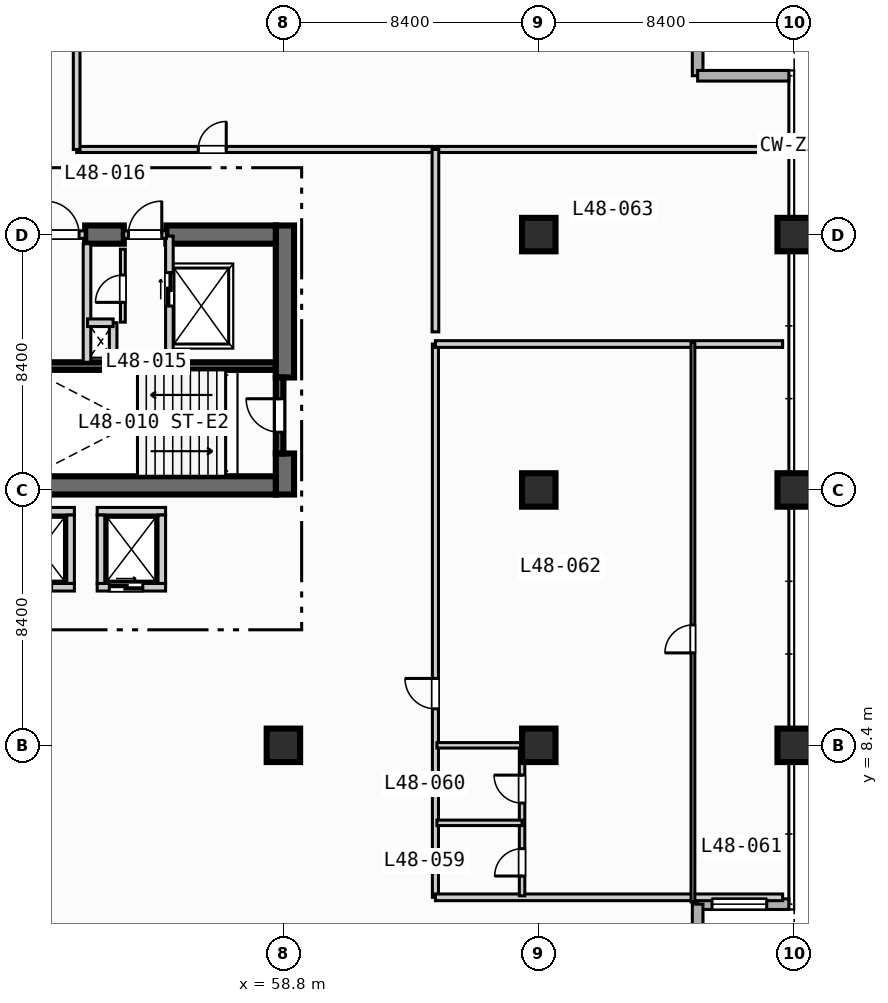
"""IFC4 building model, lengths in metres.
Left out: names, types, materials, properties, quantities, classifications, styles, units other than length and angle.
Written with IfcOpenShell. Run it as: python <this file> out.ifc"""

import sys

from ifc_helpers import new_model, si_unit, direction, frame, frame_2d, origin, origin_2d, place, context, subcontext, project, spatial, rectangle, extrude, element, fill, save


model = new_model("IFC4")
c1 = context("Model", 3, precision=1e-05, world=origin(), true_north=direction((0.0, 1.0)))
c2 = subcontext(c1, "Body", "Model", "MODEL_VIEW")
j1 = project(units=[si_unit("LENGTHUNIT", "METRE"), si_unit("PLANEANGLEUNIT", "RADIAN")], contexts=[c1])
p1 = place(None, origin())
s1 = spatial("IfcSite", under=j1, at=p1, CompositionType="ELEMENT")
p2 = place(p1, origin())
s2 = spatial("IfcBuilding", under=s1, at=p2, CompositionType="ELEMENT")
p3 = place(p2, frame((0.0, 0.0, 197.6)))
s3 = spatial("IfcBuildingStorey", under=s2, at=p3, CompositionType="ELEMENT", Elevation=197.6)
p4 = place(p3, frame((50.5, 20.875, 0.0), z_axis=(0.0, 0.0, 1.0), x_axis=(1.0, 0.0, 0.0)))
e1 = element("IfcWall", 1, at=p4, inside=s3, PredefinedType="SOLIDWALL", context=c2, shape_type="SweptSolid", body=[
    extrude(rectangle(XDim=8.05, YDim=0.25, at=frame_2d((4.025, 0.0))), origin(), (0.0, 0.0, 1.0), 3.47),
])
p5 = place(p3, frame((58.85, 16.65, 0.0), z_axis=(0.0, 0.0, 1.0), x_axis=(0.0, 1.0, 0.0)))
e2 = element("IfcWall", 2, at=p5, inside=s3, PredefinedType="SHEAR", context=c2, shape_type="SweptSolid", body=[
    extrude(rectangle(XDim=1.35, YDim=0.6, at=frame_2d((0.675, 0.0))), origin(), (0.0, 0.0, 1.0), 3.47),
])
p6 = place(p3, frame((58.85, 20.5, 0.0), z_axis=(0.0, 0.0, 1.0), x_axis=(0.0, 1.0, 0.0)))
e3 = element("IfcWall", 3, at=p6, inside=s3, PredefinedType="SHEAR", context=c2, shape_type="SweptSolid", body=[
    extrude(rectangle(XDim=5.0, YDim=0.6, at=frame_2d((2.5, 0.0))), origin(), (0.0, 0.0, 1.0), 3.47),
])
p7 = place(p3, frame((42.2, 16.95, 0.0), z_axis=(0.0, 0.0, 1.0), x_axis=(1.0, 0.0, 0.0)))
e4 = element("IfcWall", 4, at=p7, inside=s3, PredefinedType="SHEAR", context=c2, shape_type="SweptSolid", body=[
    extrude(rectangle(XDim=16.35, YDim=0.6, at=frame_2d((8.175, 0.0))), origin(), (0.0, 0.0, 1.0), 3.47),
])
p8 = place(p3, frame((52.28, 25.2, 0.0), z_axis=(0.0, 0.0, 1.0), x_axis=(1.0, 0.0, 0.0)))
e5 = element("IfcWall", 5, at=p8, inside=s3, PredefinedType="SHEAR", context=c2, shape_type="SweptSolid", body=[
    extrude(rectangle(XDim=1.27, YDim=0.6, at=frame_2d((0.635, 0.0))), origin(), (0.0, 0.0, 1.0), 3.47),
])
p9 = place(p3, frame((54.95, 25.2, 0.0), z_axis=(0.0, 0.0, 1.0), x_axis=(1.0, 0.0, 0.0)))
e6 = element("IfcWall", 6, at=p9, inside=s3, PredefinedType="SHEAR", context=c2, shape_type="SweptSolid", body=[
    extrude(rectangle(XDim=3.6, YDim=0.6, at=frame_2d((1.8, 0.0))), origin(), (0.0, 0.0, 1.0), 3.47),
])
for number, where, z_axis, x_axis in (
    (7, (58.8, 8.4, 0.0), (0.0, 0.0, 1.0), (1.0, 0.0, 0.0)),
    (8, (67.2, 8.4, 0.0), (0.0, 0.0, 1.0), (1.0, 0.0, 0.0)),
    (9, (67.2, 16.8, 0.0), (0.0, 0.0, 1.0), (1.0, 0.0, 0.0)),
    (10, (67.2, 25.2, 0.0), (0.0, 0.0, 1.0), (1.0, 0.0, 0.0)),
    (11, (75.6, 8.4, 0.0), (0.0, 0.0, 1.0), (1.0, 0.0, 0.0)),
    (12, (75.6, 16.8, 0.0), (0.0, 0.0, 1.0), (1.0, 0.0, 0.0)),
    (13, (75.6, 25.2, 0.0), (0.0, 0.0, 1.0), (1.0, 0.0, 0.0)),
):
    element("IfcColumn", number, at=place(p3, frame(where, z_axis=z_axis, x_axis=x_axis)), inside=s3, PredefinedType="COLUMN", context=c2, shape_type="SweptSolid", body=[
        extrude(rectangle(XDim=1.1, YDim=1.1, at=origin_2d()), origin(), (0.0, 0.0, 1.0), 3.7),
    ])
for number, where, z_axis, x_axis in (
    (14, (72.425, 33.425, 0.0), (0.0, 0.0, 1.0), (0.0, -1.0, 0.0)),
    (15, (72.425, 30.425, 0.0), (0.0, 0.0, 1.0), (1.0, 0.0, 0.0)),
):
    element("IfcWall", number, at=place(p3, frame(where, z_axis=z_axis, x_axis=x_axis)), inside=s3, PredefinedType="STANDARD", context=c2, shape_type="SweptSolid", body=[
        extrude(rectangle(XDim=3.0, YDim=0.35, at=frame_2d((1.5, 0.0))), origin(), (0.0, 0.0, 1.0), 3.47),
    ])
p10 = place(p3, frame((75.425, 3.175, 0.0), z_axis=(0.0, 0.0, 1.0), x_axis=(-1.0, 0.0, 0.0)))
e16 = element("IfcWall", 16, at=p10, inside=s3, PredefinedType="STANDARD", context=c2, shape_type="SweptSolid", body=[
    extrude(rectangle(XDim=3.0, YDim=0.35, at=frame_2d((1.5, 0.0))), origin(), (0.0, 0.0, 1.0), 3.47),
])
p11 = place(p10, frame((0.728, 0.0, 0.85)))
e17 = element("IfcOpeningElement", 17, at=p11, cuts=e16, PredefinedType="OPENING", context=c2, shape_type="SweptSolid", body=[
    extrude(rectangle(XDim=1.8, YDim=1.8, at=frame_2d((0.9, 0.9))), frame((0.0, 0.185, 0.0), z_axis=(0.0, -1.0, 0.0), x_axis=(1.0, 0.0, 0.0)), (0.0, 0.0, 1.0), 0.37),
])
p12 = place(p3, frame((72.425, 3.175, 0.0), z_axis=(0.0, 0.0, 1.0), x_axis=(0.0, -1.0, 0.0)))
e18 = element("IfcWall", 18, at=p12, inside=s3, PredefinedType="STANDARD", context=c2, shape_type="SweptSolid", body=[
    extrude(rectangle(XDim=3.0, YDim=0.35, at=frame_2d((1.5, 0.0))), origin(), (0.0, 0.0, 1.0), 3.47),
])
p13 = place(p3, frame((58.675, 18.0, 0.0), z_axis=(0.0, 0.0, 1.0), x_axis=(0.0, 1.0, 0.0)))
e19 = element("IfcWall", 19, at=p13, inside=s3, PredefinedType="SOLIDWALL", context=c2, shape_type="SweptSolid", body=[
    extrude(rectangle(XDim=2.5, YDim=0.25, at=frame_2d((1.25, 0.0))), origin(), (0.0, 0.0, 1.0), 3.47),
])
p14 = place(p13, frame((0.7, 0.0, 0.0)))
e20 = element("IfcOpeningElement", 20, at=p14, cuts=e19, PredefinedType="OPENING", context=c2, shape_type="SweptSolid", body=[
    extrude(rectangle(XDim=1.1, YDim=2.15, at=frame_2d((0.55, 1.075))), frame((0.0, 0.135, 0.0), z_axis=(0.0, -1.0, 0.0), x_axis=(1.0, 0.0, 0.0)), (0.0, 0.0, 1.0), 0.27),
])
p15 = place(p3, frame((50.8, 25.2, 0.0), z_axis=(0.0, 0.0, 1.0), x_axis=(1.0, 0.0, 0.0)))
e21 = element("IfcWall", 21, at=p15, inside=s3, PredefinedType="SOLIDWALL", context=c2, shape_type="SweptSolid", body=[
    extrude(rectangle(XDim=1.48, YDim=0.25, at=frame_2d((0.74, 0.0))), origin(), (0.0, 0.0, 1.0), 3.47),
])
p16 = place(p15, frame((0.18, 0.0, 0.0)))
e22 = element("IfcOpeningElement", 22, at=p16, cuts=e21, PredefinedType="OPENING", context=c2, shape_type="SweptSolid", body=[
    extrude(rectangle(XDim=1.1, YDim=2.15, at=frame_2d((0.55, 1.075))), frame((0.0, 0.135, 0.0), z_axis=(0.0, -1.0, 0.0), x_axis=(1.0, 0.0, 0.0)), (0.0, 0.0, 1.0), 0.27),
])
p17 = place(p3, frame((52.34, 21.0, 0.0), z_axis=(0.0, 0.0, 1.0), x_axis=(0.0, 1.0, 0.0)))
e23 = element("IfcWall", 23, at=p17, inside=s3, PredefinedType="SOLIDWALL", context=c2, shape_type="SweptSolid", body=[
    extrude(rectangle(XDim=3.9, YDim=0.25, at=frame_2d((1.95, 0.0))), origin(), (0.0, 0.0, 1.0), 3.47),
])
p18 = place(p3, frame((55.05, 21.0, 0.0), z_axis=(0.0, 0.0, 1.0), x_axis=(0.0, 1.0, 0.0)))
e24 = element("IfcWall", 24, at=p18, inside=s3, PredefinedType="SOLIDWALL", context=c2, shape_type="SweptSolid", body=[
    extrude(rectangle(XDim=4.15, YDim=0.25, at=frame_2d((2.075, 0.0))), origin(), (0.0, 0.0, 1.0), 3.47),
])
p19 = place(p18, frame((1.85, 0.0, 0.0)))
e25 = element("IfcOpeningElement", 25, at=p19, cuts=e24, PredefinedType="OPENING", context=c2, shape_type="SweptSolid", body=[
    extrude(rectangle(XDim=1.1, YDim=2.15, at=frame_2d((0.55, 1.075))), frame((0.0, 0.135, 0.0), z_axis=(0.0, -1.0, 0.0), x_axis=(1.0, 0.0, 0.0)), (0.0, 0.0, 1.0), 0.27),
])
p20 = place(p3, frame((53.55, 25.2, 0.0), z_axis=(0.0, 0.0, 1.0), x_axis=(1.0, 0.0, 0.0)))
e26 = element("IfcWall", 26, at=p20, inside=s3, PredefinedType="SOLIDWALL", context=c2, shape_type="SweptSolid", body=[
    extrude(rectangle(XDim=1.4, YDim=0.25, at=frame_2d((0.7, 0.0))), origin(), (0.0, 0.0, 1.0), 3.47),
])
p21 = place(p20, frame((0.15, 0.0, 0.0)))
e27 = element("IfcOpeningElement", 27, at=p21, cuts=e26, PredefinedType="OPENING", context=c2, shape_type="SweptSolid", body=[
    extrude(rectangle(XDim=1.1, YDim=2.15, at=frame_2d((0.55, 1.075))), frame((0.0, 0.135, 0.0), z_axis=(0.0, -1.0, 0.0), x_axis=(1.0, 0.0, 0.0)), (0.0, 0.0, 1.0), 0.27),
])
p22 = place(p3, frame((53.2, 21.0, 0.0), z_axis=(0.0, 0.0, 1.0), x_axis=(0.0, 1.0, 0.0)))
e28 = element("IfcWall", 28, at=p22, inside=s3, PredefinedType="SOLIDWALL", context=c2, shape_type="SweptSolid", body=[
    extrude(rectangle(XDim=1.3, YDim=0.25, at=frame_2d((0.65, 0.0))), origin(), (0.0, 0.0, 1.0), 3.47),
])
p23 = place(p3, frame((52.36, 22.3, 0.0), z_axis=(0.0, 0.0, 1.0), x_axis=(1.0, 0.0, 0.0)))
e29 = element("IfcWall", 29, at=p23, inside=s3, PredefinedType="SOLIDWALL", context=c2, shape_type="SweptSolid", body=[
    extrude(rectangle(XDim=0.84, YDim=0.25, at=frame_2d((0.42, 0.0))), origin(), (0.0, 0.0, 1.0), 3.47),
])
p24 = place(p3, frame((53.52, 22.32, 0.0), z_axis=(0.0, 0.0, 1.0), x_axis=(0.0, 1.0, 0.0)))
e30 = element("IfcWall", 30, at=p24, inside=s3, PredefinedType="PARTITIONING", context=c2, shape_type="SweptSolid", body=[
    extrude(rectangle(XDim=2.4, YDim=0.16, at=frame_2d((1.2, 0.0))), origin(), (0.0, 0.0, 1.0), 3.47),
])
p25 = place(p24, frame((0.65, 0.0, 0.0)))
e31 = element("IfcOpeningElement", 31, at=p25, cuts=e30, PredefinedType="OPENING", context=c2, shape_type="SweptSolid", body=[
    extrude(rectangle(XDim=0.9, YDim=2.1, at=frame_2d((0.45, 1.05))), frame((0.0, 0.09, 0.0), z_axis=(0.0, -1.0, 0.0), x_axis=(1.0, 0.0, 0.0)), (0.0, 0.0, 1.0), 0.18),
])
p26 = place(p3, frame((49.675, 13.6, 0.0), z_axis=(0.0, 0.0, 1.0), x_axis=(1.0, 0.0, 0.0)))
e32 = element("IfcWall", 32, at=p26, inside=s3, PredefinedType="SOLIDWALL", context=c2, shape_type="SweptSolid", body=[
    extrude(rectangle(XDim=2.25, YDim=0.25, at=frame_2d((1.125, 0.0))), origin(), (0.0, 0.0, 1.0), 3.47),
])
p27 = place(p26, frame((0.4, 0.0, 0.0)))
e33 = element("IfcOpeningElement", 33, at=p27, cuts=e32, PredefinedType="OPENING", context=c2, shape_type="SweptSolid", body=[
    extrude(rectangle(XDim=1.1, YDim=2.15, at=frame_2d((0.55, 1.075))), frame((0.0, 0.135, 0.0), z_axis=(0.0, -1.0, 0.0), x_axis=(1.0, 0.0, 0.0)), (0.0, 0.0, 1.0), 0.27),
])
for number, where, z_axis, x_axis in (
    (34, (49.675, 16.1, 0.0), (0.0, 0.0, 1.0), (1.0, 0.0, 0.0)),
    (35, (51.8, 13.725, 0.0), (0.0, 0.0, 1.0), (0.0, 1.0, 0.0)),
):
    element("IfcWall", number, at=place(p3, frame(where, z_axis=z_axis, x_axis=x_axis)), inside=s3, PredefinedType="SOLIDWALL", context=c2, shape_type="SweptSolid", body=[
        extrude(rectangle(XDim=2.25, YDim=0.25, at=frame_2d((1.125, 0.0))), origin(), (0.0, 0.0, 1.0), 3.47),
    ])
p28 = place(p3, frame((52.675, 13.6, 0.0), z_axis=(0.0, 0.0, 1.0), x_axis=(1.0, 0.0, 0.0)))
e36 = element("IfcWall", 36, at=p28, inside=s3, PredefinedType="SOLIDWALL", context=c2, shape_type="SweptSolid", body=[
    extrude(rectangle(XDim=2.25, YDim=0.25, at=frame_2d((1.125, 0.0))), origin(), (0.0, 0.0, 1.0), 3.47),
])
p29 = place(p28, frame((0.4, 0.0, 0.0)))
e37 = element("IfcOpeningElement", 37, at=p29, cuts=e36, PredefinedType="OPENING", context=c2, shape_type="SweptSolid", body=[
    extrude(rectangle(XDim=1.1, YDim=2.15, at=frame_2d((0.55, 1.075))), frame((0.0, 0.135, 0.0), z_axis=(0.0, -1.0, 0.0), x_axis=(1.0, 0.0, 0.0)), (0.0, 0.0, 1.0), 0.27),
])
for number, where, z_axis, x_axis in (
    (38, (52.675, 16.1, 0.0), (0.0, 0.0, 1.0), (1.0, 0.0, 0.0)),
    (39, (52.8, 13.725, 0.0), (0.0, 0.0, 1.0), (0.0, 1.0, 0.0)),
    (40, (54.8, 13.725, 0.0), (0.0, 0.0, 1.0), (0.0, 1.0, 0.0)),
):
    element("IfcWall", number, at=place(p3, frame(where, z_axis=z_axis, x_axis=x_axis)), inside=s3, PredefinedType="SOLIDWALL", context=c2, shape_type="SweptSolid", body=[
        extrude(rectangle(XDim=2.25, YDim=0.25, at=frame_2d((1.125, 0.0))), origin(), (0.0, 0.0, 1.0), 3.47),
    ])
p30 = place(p3, frame((63.8, 3.4, 0.0), z_axis=(0.0, 0.0, 1.0), x_axis=(0.0, 1.0, 0.0)))
e41 = element("IfcWall", 41, at=p30, inside=s3, PredefinedType="PARTITIONING", context=c2, shape_type="SweptSolid", body=[
    extrude(rectangle(XDim=18.2, YDim=0.2, at=frame_2d((9.1, 0.0))), origin(), (0.0, 0.0, 1.0), 3.47),
])
p31 = place(p30, frame((6.2, 0.0, 0.0)))
e42 = element("IfcOpeningElement", 42, at=p31, cuts=e41, PredefinedType="OPENING", context=c2, shape_type="SweptSolid", body=[
    extrude(rectangle(XDim=1.0, YDim=2.15, at=frame_2d((0.5, 1.075))), frame((0.0, 0.11, 0.0), z_axis=(0.0, -1.0, 0.0), x_axis=(1.0, 0.0, 0.0)), (0.0, 0.0, 1.0), 0.22),
])
for number, where, z_axis, x_axis in (
    (43, (63.8, 3.4, 0.0), (0.0, 0.0, 1.0), (1.0, 0.0, 0.0)),
    (44, (63.8, 21.6, 0.0), (0.0, 0.0, 1.0), (1.0, 0.0, 0.0)),
):
    element("IfcWall", number, at=place(p3, frame(where, z_axis=z_axis, x_axis=x_axis)), inside=s3, PredefinedType="PARTITIONING", context=c2, shape_type="SweptSolid", body=[
        extrude(rectangle(XDim=11.42, YDim=0.22, at=frame_2d((5.71, 0.0))), origin(), (0.0, 0.0, 1.0), 3.47),
    ])
p32 = place(p3, frame((66.65, 3.45, 0.0), z_axis=(0.0, 0.0, 1.0), x_axis=(0.0, 1.0, 0.0)))
e45 = element("IfcWall", 45, at=p32, inside=s3, PredefinedType="PLUMBINGWALL", context=c2, shape_type="SweptSolid", body=[
    extrude(rectangle(XDim=4.95, YDim=0.18, at=frame_2d((2.475, 0.0))), origin(), (0.0, 0.0, 1.0), 3.47),
])
p33 = place(p32, frame((0.65, 0.0, 0.0)))
e46 = element("IfcOpeningElement", 46, at=p33, cuts=e45, PredefinedType="OPENING", context=c2, shape_type="SweptSolid", body=[
    extrude(rectangle(XDim=0.9, YDim=2.1, at=frame_2d((0.45, 1.05))), frame((0.0, 0.1, 0.0), z_axis=(0.0, -1.0, 0.0), x_axis=(1.0, 0.0, 0.0)), (0.0, 0.0, 1.0), 0.2),
])
p34 = place(p32, frame((3.05, 0.0, 0.0)))
e47 = element("IfcOpeningElement", 47, at=p34, cuts=e45, PredefinedType="OPENING", context=c2, shape_type="SweptSolid", body=[
    extrude(rectangle(XDim=0.92, YDim=2.1, at=frame_2d((0.46, 1.05))), frame((0.0, 0.1, 0.0), z_axis=(0.0, -1.0, 0.0), x_axis=(1.0, 0.0, 0.0)), (0.0, 0.0, 1.0), 0.2),
])
p35 = place(p3, frame((63.85, 5.85, 0.0), z_axis=(0.0, 0.0, 1.0), x_axis=(1.0, 0.0, 0.0)))
e48 = element("IfcWall", 48, at=p35, inside=s3, PredefinedType="PLUMBINGWALL", context=c2, shape_type="SweptSolid", body=[
    extrude(rectangle(XDim=2.8, YDim=0.18, at=frame_2d((1.4, 0.0))), origin(), (0.0, 0.0, 1.0), 3.47),
])
p36 = place(p3, frame((63.85, 8.4, 0.0), z_axis=(0.0, 0.0, 1.0), x_axis=(1.0, 0.0, 0.0)))
e49 = element("IfcWall", 49, at=p36, inside=s3, PredefinedType="PLUMBINGWALL", context=c2, shape_type="SweptSolid", body=[
    extrude(rectangle(XDim=2.8, YDim=0.18, at=frame_2d((1.4, 0.0))), origin(), (0.0, 0.0, 1.0), 2.82),
])
p37 = place(p3, frame((72.27, 3.25, 0.0), z_axis=(0.0, 0.0, 1.0), x_axis=(0.0, 1.0, 0.0)))
e50 = element("IfcWall", 50, at=p37, inside=s3, PredefinedType="PARTITIONING", context=c2, shape_type="SweptSolid", body=[
    extrude(rectangle(XDim=18.4, YDim=0.125, at=frame_2d((9.2, 0.0))), origin(), (0.0, 0.0, 1.0), 3.47),
])
p38 = place(p37, frame((8.19, 0.0, 0.0)))
e51 = element("IfcOpeningElement", 51, at=p38, cuts=e50, PredefinedType="OPENING", context=c2, shape_type="SweptSolid", body=[
    extrude(rectangle(XDim=0.92, YDim=2.1, at=frame_2d((0.46, 1.05))), frame((0.0, 0.073, 0.0), z_axis=(0.0, -1.0, 0.0), x_axis=(1.0, 0.0, 0.0)), (0.0, 0.0, 1.0), 0.145),
])
p39 = place(p3, frame((52.0, 28.0, 0.0), z_axis=(0.0, 0.0, 1.0), x_axis=(1.0, 0.0, 0.0)))
e52 = element("IfcWall", 52, at=p39, inside=s3, PredefinedType="PARTITIONING", context=c2, shape_type="SweptSolid", body=[
    extrude(rectangle(XDim=23.25, YDim=0.2, at=frame_2d((11.625, 0.0))), origin(), (0.0, 0.0, 1.0), 3.47),
])
p40 = place(p39, frame((4.0, 0.0, 0.0)))
e53 = element("IfcOpeningElement", 53, at=p40, cuts=e52, PredefinedType="OPENING", context=c2, shape_type="SweptSolid", body=[
    extrude(rectangle(XDim=0.92, YDim=2.1, at=frame_2d((0.46, 1.05))), frame((0.0, 0.11, 0.0), z_axis=(0.0, -1.0, 0.0), x_axis=(1.0, 0.0, 0.0)), (0.0, 0.0, 1.0), 0.22),
])
p41 = place(p3, frame((52.0, 28.0, 0.0), z_axis=(0.0, 0.0, 1.0), x_axis=(0.0, 1.0, 0.0)))
e54 = element("IfcWall", 54, at=p41, inside=s3, PredefinedType="PARTITIONING", context=c2, shape_type="SweptSolid", body=[
    extrude(rectangle(XDim=5.3, YDim=0.22, at=frame_2d((2.65, 0.0))), origin(), (0.0, 0.0, 1.0), 3.47),
])
p42 = place(p3, frame((63.8, 22.0, 0.0), z_axis=(0.0, 0.0, 1.0), x_axis=(0.0, 1.0, 0.0)))
e55 = element("IfcWall", 55, at=p42, inside=s3, PredefinedType="PARTITIONING", context=c2, shape_type="SweptSolid", body=[
    extrude(rectangle(XDim=6.0, YDim=0.22, at=frame_2d((3.0, 0.0))), origin(), (0.0, 0.0, 1.0), 3.47),
])
p43 = place(p11, origin())
e56 = element("IfcWindow", 56, at=p43, inside=s3, PartitioningType="SINGLE_PANEL", PredefinedType="WINDOW", context=c2, shape_type="SweptSolid", body=[
    extrude(rectangle(XDim=1.8, YDim=1.8, at=frame_2d((0.9, 0.9))), frame((0.0, 0.03, 0.0), z_axis=(0.0, -1.0, 0.0), x_axis=(1.0, 0.0, 0.0)), (0.0, 0.0, 1.0), 0.06),
])
fill(e17, e56)
p44 = place(p14, origin())
e57 = element("IfcDoor", 57, at=p44, inside=s3, OperationType="SINGLE_SWING_RIGHT", PredefinedType="DOOR", context=c2, shape_type="SweptSolid", body=[
    extrude(rectangle(XDim=1.1, YDim=2.15, at=frame_2d((0.55, 1.075))), frame((0.0, 0.025, 0.0), z_axis=(0.0, -1.0, 0.0), x_axis=(1.0, 0.0, 0.0)), (0.0, 0.0, 1.0), 0.05),
])
fill(e20, e57)
p45 = place(p16, origin())
e58 = element("IfcDoor", 58, at=p45, inside=s3, OperationType="SINGLE_SWING_LEFT", PredefinedType="DOOR", context=c2, shape_type="SweptSolid", body=[
    extrude(rectangle(XDim=1.1, YDim=2.15, at=frame_2d((0.55, 1.075))), frame((0.0, 0.025, 0.0), z_axis=(0.0, -1.0, 0.0), x_axis=(1.0, 0.0, 0.0)), (0.0, 0.0, 1.0), 0.05),
])
fill(e22, e58)
p46 = place(p19, origin())
e59 = element("IfcDoor", 59, at=p46, inside=s3, OperationType="SLIDING_TO_LEFT", PredefinedType="DOOR", context=c2, shape_type="SweptSolid", body=[
    extrude(rectangle(XDim=1.1, YDim=2.15, at=frame_2d((0.55, 1.075))), frame((0.0, 0.025, 0.0), z_axis=(0.0, -1.0, 0.0), x_axis=(1.0, 0.0, 0.0)), (0.0, 0.0, 1.0), 0.05),
])
fill(e25, e59)
p47 = place(p21, origin())
e60 = element("IfcDoor", 60, at=p47, inside=s3, OperationType="SINGLE_SWING_RIGHT", PredefinedType="DOOR", context=c2, shape_type="SweptSolid", body=[
    extrude(rectangle(XDim=1.1, YDim=2.15, at=frame_2d((0.55, 1.075))), frame((0.0, 0.025, 0.0), z_axis=(0.0, -1.0, 0.0), x_axis=(1.0, 0.0, 0.0)), (0.0, 0.0, 1.0), 0.05),
])
fill(e27, e60)
p48 = place(p25, origin())
e61 = element("IfcDoor", 61, at=p48, inside=s3, OperationType="SINGLE_SWING_LEFT", PredefinedType="DOOR", context=c2, shape_type="SweptSolid", body=[
    extrude(rectangle(XDim=0.9, YDim=2.1, at=frame_2d((0.45, 1.05))), frame((0.0, 0.025, 0.0), z_axis=(0.0, -1.0, 0.0), x_axis=(1.0, 0.0, 0.0)), (0.0, 0.0, 1.0), 0.05),
])
fill(e31, e61)
p49 = place(p29, origin())
e62 = element("IfcDoor", 62, at=p49, inside=s3, OperationType="SLIDING_TO_LEFT", PredefinedType="DOOR", context=c2, shape_type="SweptSolid", body=[
    extrude(rectangle(XDim=1.1, YDim=2.15, at=frame_2d((0.55, 1.075))), frame((0.0, 0.025, 0.0), z_axis=(0.0, -1.0, 0.0), x_axis=(1.0, 0.0, 0.0)), (0.0, 0.0, 1.0), 0.05),
])
fill(e37, e62)
p50 = place(p31, origin())
e63 = element("IfcDoor", 63, at=p50, inside=s3, OperationType="SINGLE_SWING_RIGHT", PredefinedType="DOOR", context=c2, shape_type="SweptSolid", body=[
    extrude(rectangle(XDim=1.0, YDim=2.15, at=frame_2d((0.5, 1.075))), frame((0.0, 0.025, 0.0), z_axis=(0.0, -1.0, 0.0), x_axis=(1.0, 0.0, 0.0)), (0.0, 0.0, 1.0), 0.05),
])
fill(e42, e63)
p51 = place(p33, origin())
e64 = element("IfcDoor", 64, at=p51, inside=s3, OperationType="SINGLE_SWING_LEFT", PredefinedType="DOOR", context=c2, shape_type="SweptSolid", body=[
    extrude(rectangle(XDim=0.9, YDim=2.1, at=frame_2d((0.45, 1.05))), frame((0.0, 0.025, 0.0), z_axis=(0.0, -1.0, 0.0), x_axis=(1.0, 0.0, 0.0)), (0.0, 0.0, 1.0), 0.05),
])
fill(e46, e64)
p52 = place(p34, origin())
e65 = element("IfcDoor", 65, at=p52, inside=s3, OperationType="SINGLE_SWING_RIGHT", PredefinedType="DOOR", context=c2, shape_type="SweptSolid", body=[
    extrude(rectangle(XDim=0.92, YDim=2.1, at=frame_2d((0.46, 1.05))), frame((0.0, 0.025, 0.0), z_axis=(0.0, -1.0, 0.0), x_axis=(1.0, 0.0, 0.0)), (0.0, 0.0, 1.0), 0.05),
])
fill(e47, e65)
p53 = place(p38, origin())
e66 = element("IfcDoor", 66, at=p53, inside=s3, OperationType="SINGLE_SWING_LEFT", PredefinedType="DOOR", context=c2, shape_type="SweptSolid", body=[
    extrude(rectangle(XDim=0.92, YDim=2.1, at=frame_2d((0.46, 1.05))), frame((0.0, 0.025, 0.0), z_axis=(0.0, -1.0, 0.0), x_axis=(1.0, 0.0, 0.0)), (0.0, 0.0, 1.0), 0.05),
])
fill(e51, e66)
p54 = place(p40, origin())
e67 = element("IfcDoor", 67, at=p54, inside=s3, OperationType="SINGLE_SWING_RIGHT", PredefinedType="DOOR", context=c2, shape_type="SweptSolid", body=[
    extrude(rectangle(XDim=0.92, YDim=2.1, at=frame_2d((0.46, 1.05))), frame((0.0, 0.025, 0.0), z_axis=(0.0, -1.0, 0.0), x_axis=(1.0, 0.0, 0.0)), (0.0, 0.0, 1.0), 0.05),
])
fill(e53, e67)
save(model, sys.argv[1])
